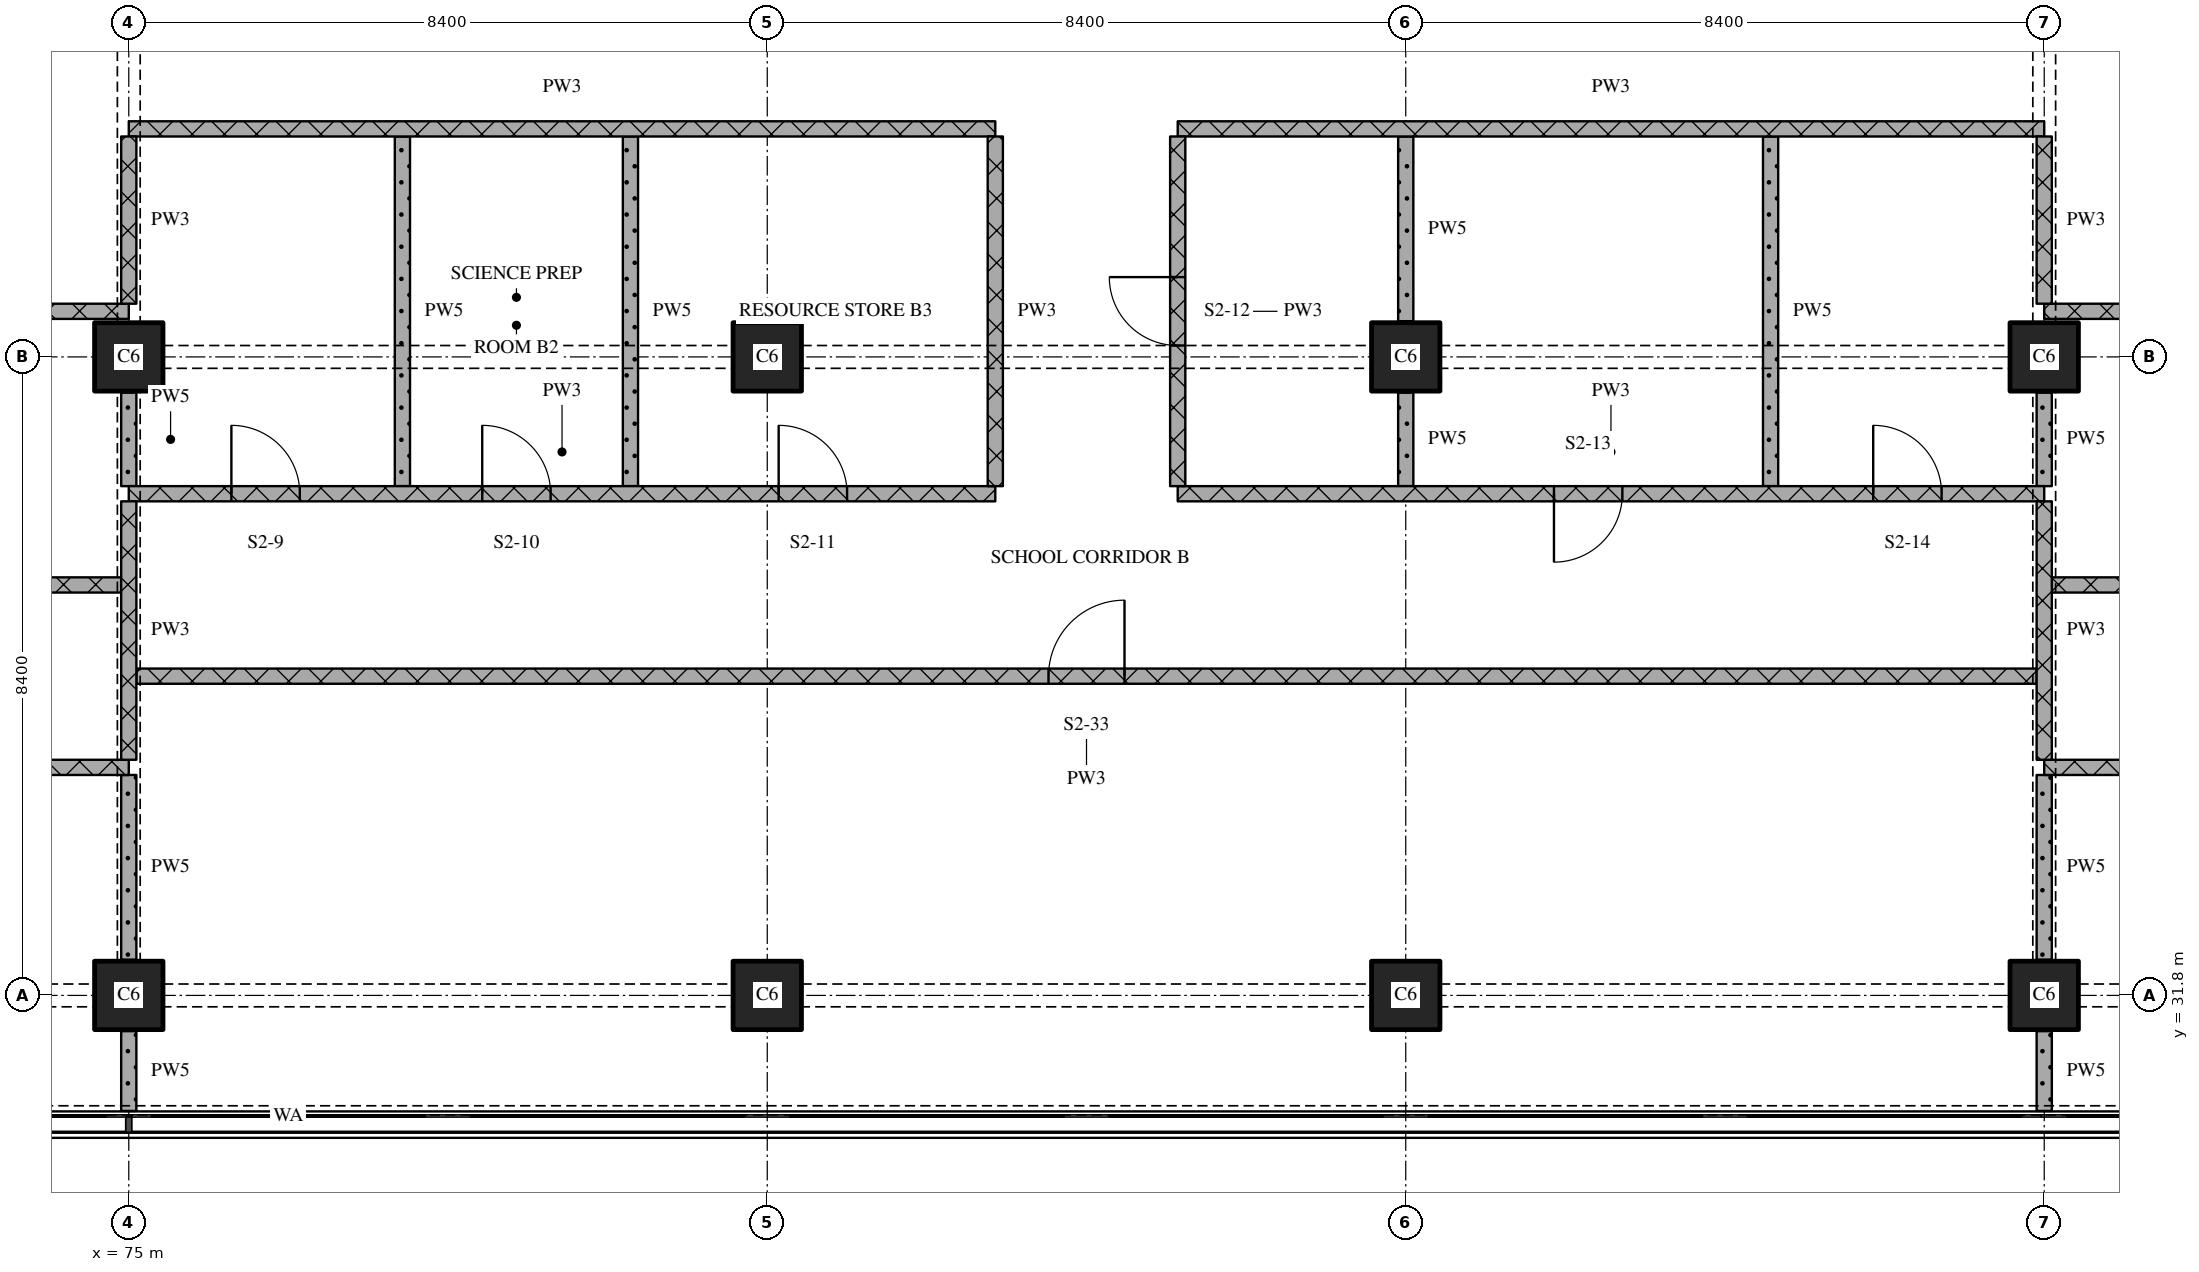
"""IFC4 building model, lengths in metres.
Left out: names, types, materials, properties, quantities, classifications, styles, units other than length and angle.
Written with IfcOpenShell. Run it as: python <this file> out.ifc"""

import sys

from ifc_helpers import new_model, si_unit, direction, frame, frame_2d, origin, origin_2d, place, context, subcontext, project, spatial, rectangle, extrude, element, fill, save


model = new_model("IFC4")
c1 = context("Model", 3, precision=1e-05, world=origin(), true_north=direction((0.0, 1.0)))
c2 = subcontext(c1, "Body", "Model", "MODEL_VIEW")
j1 = project(units=[si_unit("LENGTHUNIT", "METRE"), si_unit("PLANEANGLEUNIT", "RADIAN")], contexts=[c1])
p1 = place(None, origin())
s1 = spatial("IfcSite", under=j1, at=p1, CompositionType="ELEMENT")
p2 = place(p1, origin())
s2 = spatial("IfcBuilding", under=s1, at=p2, CompositionType="ELEMENT")
p3 = place(p2, frame((0.0, 0.0, 28.2)))
s3 = spatial("IfcBuildingStorey", under=s2, at=p3, CompositionType="ELEMENT", Elevation=28.2)
for number, where, z_axis, x_axis in (
    (1, (75.0, 31.8, 0.0), (0.0, 0.0, 1.0), (1.0, 0.0, 0.0)),
    (2, (75.0, 40.2, 0.0), (0.0, 0.0, 1.0), (1.0, 0.0, 0.0)),
    (3, (83.4, 31.8, 0.0), (0.0, 0.0, 1.0), (1.0, 0.0, 0.0)),
    (4, (83.4, 40.2, 0.0), (0.0, 0.0, 1.0), (1.0, 0.0, 0.0)),
    (5, (91.8, 31.8, 0.0), (0.0, 0.0, 1.0), (1.0, 0.0, 0.0)),
    (6, (91.8, 40.2, 0.0), (0.0, 0.0, 1.0), (1.0, 0.0, 0.0)),
    (7, (100.2, 31.8, 0.0), (0.0, 0.0, 1.0), (1.0, 0.0, 0.0)),
    (8, (100.2, 40.2, 0.0), (0.0, 0.0, 1.0), (1.0, 0.0, 0.0)),
):
    element("IfcColumn", number, at=place(p3, frame(where, z_axis=z_axis, x_axis=x_axis)), inside=s3, PredefinedType="COLUMN", context=c2, shape_type="SweptSolid", body=[
        extrude(rectangle(XDim=0.9, YDim=0.9, at=origin_2d()), origin(), (0.0, 0.0, 1.0), 4.5),
    ])
p4 = place(p3, frame((75.0, 34.8, 0.0), z_axis=(0.0, 0.0, 1.0), x_axis=(-1.0, 0.0, 0.0)))
e9 = element("IfcWall", 9, at=p4, inside=s3, PredefinedType="PARTITIONING", context=c2, shape_type="SweptSolid", body=[
    extrude(rectangle(XDim=26.72, YDim=0.2, at=frame_2d((13.36, 0.0))), origin(), (0.0, 0.0, 1.0), 4.2),
])
p5 = place(p4, frame((11.204, 0.0, 0.0)))
e10 = element("IfcOpeningElement", 10, at=p5, cuts=e9, PredefinedType="OPENING", context=c2, shape_type="SweptSolid", body=[
    extrude(rectangle(XDim=1.0, YDim=2.1, at=frame_2d((0.5, 1.05))), frame((0.0, 0.11, 0.0), z_axis=(0.0, -1.0, 0.0), x_axis=(1.0, 0.0, 0.0)), (0.0, 0.0, 1.0), 0.22),
])
p6 = place(p3, frame((126.92, 34.8, 0.0), z_axis=(0.0, 0.0, 1.0), x_axis=(-1.0, 0.0, 0.0)))
e11 = element("IfcWall", 11, at=p6, inside=s3, PredefinedType="PARTITIONING", context=c2, shape_type="SweptSolid", body=[
    extrude(rectangle(XDim=26.72, YDim=0.2, at=frame_2d((13.36, 0.0))), origin(), (0.0, 0.0, 1.0), 4.2),
])
p7 = place(p6, frame((14.516, 0.0, 0.0)))
e12 = element("IfcOpeningElement", 12, at=p7, cuts=e11, PredefinedType="OPENING", context=c2, shape_type="SweptSolid", body=[
    extrude(rectangle(XDim=1.0, YDim=2.1, at=frame_2d((0.5, 1.05))), frame((0.0, 0.11, 0.0), z_axis=(0.0, -1.0, 0.0), x_axis=(1.0, 0.0, 0.0)), (0.0, 0.0, 1.0), 0.22),
])
p8 = place(p3, frame((100.1, 36.0, 0.0), z_axis=(0.0, 0.0, 1.0), x_axis=(-1.0, 0.0, 0.0)))
e13 = element("IfcWall", 13, at=p8, inside=s3, PredefinedType="PARTITIONING", context=c2, shape_type="SweptSolid", body=[
    extrude(rectangle(XDim=25.0, YDim=0.2, at=frame_2d((12.5, 0.0))), origin(), (0.0, 0.0, 1.0), 4.2),
])
p9 = place(p8, frame((12.0, 0.0, 0.0)))
e14 = element("IfcOpeningElement", 14, at=p9, cuts=e13, PredefinedType="OPENING", context=c2, shape_type="SweptSolid", body=[
    extrude(rectangle(XDim=1.0, YDim=2.1, at=frame_2d((0.5, 1.05))), frame((0.0, 0.11, 0.0), z_axis=(0.0, -1.0, 0.0), x_axis=(1.0, 0.0, 0.0)), (0.0, 0.0, 1.0), 0.22),
])
p10 = place(p3, frame((63.9, 37.2, 0.0), z_axis=(0.0, 0.0, 1.0), x_axis=(1.0, 0.0, 0.0)))
e15 = element("IfcWall", 15, at=p10, inside=s3, PredefinedType="PARTITIONING", context=c2, shape_type="SweptSolid", body=[
    extrude(rectangle(XDim=11.0, YDim=0.2, at=frame_2d((5.5, 0.0))), origin(), (0.0, 0.0, 1.0), 4.2),
])
p11 = place(p10, frame((7.5, 0.0, 0.0)))
e16 = element("IfcOpeningElement", 16, at=p11, cuts=e15, PredefinedType="OPENING", context=c2, shape_type="SweptSolid", body=[
    extrude(rectangle(XDim=0.9, YDim=2.1, at=frame_2d((0.45, 1.05))), frame((0.0, 0.11, 0.0), z_axis=(0.0, -1.0, 0.0), x_axis=(1.0, 0.0, 0.0)), (0.0, 0.0, 1.0), 0.22),
])
p12 = place(p3, frame((100.3, 37.2, 0.0), z_axis=(0.0, 0.0, 1.0), x_axis=(1.0, 0.0, 0.0)))
e17 = element("IfcWall", 17, at=p12, inside=s3, PredefinedType="PARTITIONING", context=c2, shape_type="SweptSolid", body=[
    extrude(rectangle(XDim=11.0, YDim=0.2, at=frame_2d((5.5, 0.0))), origin(), (0.0, 0.0, 1.0), 4.2),
])
p13 = place(p12, frame((1.85, 0.0, 0.0)))
e18 = element("IfcOpeningElement", 18, at=p13, cuts=e17, PredefinedType="OPENING", context=c2, shape_type="SweptSolid", body=[
    extrude(rectangle(XDim=0.9, YDim=2.1, at=frame_2d((0.45, 1.05))), frame((0.0, 0.11, 0.0), z_axis=(0.0, -1.0, 0.0), x_axis=(1.0, 0.0, 0.0)), (0.0, 0.0, 1.0), 0.22),
])
p14 = place(p12, frame((7.4, 0.0, 0.0)))
e19 = element("IfcOpeningElement", 19, at=p14, cuts=e17, PredefinedType="OPENING", context=c2, shape_type="SweptSolid", body=[
    extrude(rectangle(XDim=0.9, YDim=2.1, at=frame_2d((0.45, 1.05))), frame((0.0, 0.11, 0.0), z_axis=(0.0, -1.0, 0.0), x_axis=(1.0, 0.0, 0.0)), (0.0, 0.0, 1.0), 0.22),
])
p15 = place(p3, frame((75.0, 38.4, 0.0), z_axis=(0.0, 0.0, 1.0), x_axis=(1.0, 0.0, 0.0)))
e20 = element("IfcWall", 20, at=p15, inside=s3, PredefinedType="PARTITIONING", context=c2, shape_type="SweptSolid", body=[
    extrude(rectangle(XDim=11.4, YDim=0.2, at=frame_2d((5.7, 0.0))), origin(), (0.0, 0.0, 1.0), 4.2),
])
p16 = place(p15, frame((1.35, 0.0, 0.0)))
e21 = element("IfcOpeningElement", 21, at=p16, cuts=e20, PredefinedType="OPENING", context=c2, shape_type="SweptSolid", body=[
    extrude(rectangle(XDim=0.9, YDim=2.1, at=frame_2d((0.45, 1.05))), frame((0.0, 0.11, 0.0), z_axis=(0.0, -1.0, 0.0), x_axis=(1.0, 0.0, 0.0)), (0.0, 0.0, 1.0), 0.22),
])
p17 = place(p15, frame((4.65, 0.0, 0.0)))
e22 = element("IfcOpeningElement", 22, at=p17, cuts=e20, PredefinedType="OPENING", context=c2, shape_type="SweptSolid", body=[
    extrude(rectangle(XDim=0.9, YDim=2.1, at=frame_2d((0.45, 1.05))), frame((0.0, 0.11, 0.0), z_axis=(0.0, -1.0, 0.0), x_axis=(1.0, 0.0, 0.0)), (0.0, 0.0, 1.0), 0.22),
])
p18 = place(p15, frame((8.55, 0.0, 0.0)))
e23 = element("IfcOpeningElement", 23, at=p18, cuts=e20, PredefinedType="OPENING", context=c2, shape_type="SweptSolid", body=[
    extrude(rectangle(XDim=0.9, YDim=2.1, at=frame_2d((0.45, 1.05))), frame((0.0, 0.11, 0.0), z_axis=(0.0, -1.0, 0.0), x_axis=(1.0, 0.0, 0.0)), (0.0, 0.0, 1.0), 0.22),
])
p19 = place(p3, frame((88.8, 38.4, 0.0), z_axis=(0.0, 0.0, 1.0), x_axis=(1.0, 0.0, 0.0)))
e24 = element("IfcWall", 24, at=p19, inside=s3, PredefinedType="PARTITIONING", context=c2, shape_type="SweptSolid", body=[
    extrude(rectangle(XDim=11.4, YDim=0.2, at=frame_2d((5.7, 0.0))), origin(), (0.0, 0.0, 1.0), 4.2),
])
p20 = place(p19, frame((4.95, 0.0, 0.0)))
e25 = element("IfcOpeningElement", 25, at=p20, cuts=e24, PredefinedType="OPENING", context=c2, shape_type="SweptSolid", body=[
    extrude(rectangle(XDim=0.9, YDim=2.1, at=frame_2d((0.45, 1.05))), frame((0.0, 0.11, 0.0), z_axis=(0.0, -1.0, 0.0), x_axis=(1.0, 0.0, 0.0)), (0.0, 0.0, 1.0), 0.22),
])
p21 = place(p19, frame((9.15, 0.0, 0.0)))
e26 = element("IfcOpeningElement", 26, at=p21, cuts=e24, PredefinedType="OPENING", context=c2, shape_type="SweptSolid", body=[
    extrude(rectangle(XDim=0.9, YDim=2.1, at=frame_2d((0.45, 1.05))), frame((0.0, 0.11, 0.0), z_axis=(0.0, -1.0, 0.0), x_axis=(1.0, 0.0, 0.0)), (0.0, 0.0, 1.0), 0.22),
])
for number, where, z_axis, x_axis in (
    (27, (63.9, 40.8, 0.0), (0.0, 0.0, 1.0), (1.0, 0.0, 0.0)),
    (28, (100.2, 40.8, 0.0), (0.0, 0.0, 1.0), (1.0, 0.0, 0.0)),
):
    element("IfcWall", number, at=place(p3, frame(where, z_axis=z_axis, x_axis=x_axis)), inside=s3, PredefinedType="PARTITIONING", context=c2, shape_type="SweptSolid", body=[
        extrude(rectangle(XDim=11.1, YDim=0.2, at=frame_2d((5.55, 0.0))), origin(), (0.0, 0.0, 1.0), 4.2),
    ])
for number, where, z_axis, x_axis in (
    (29, (75.0, 43.2, 0.0), (0.0, 0.0, 1.0), (1.0, 0.0, 0.0)),
    (30, (88.8, 43.2, 0.0), (0.0, 0.0, 1.0), (1.0, 0.0, 0.0)),
):
    element("IfcWall", number, at=place(p3, frame(where, z_axis=z_axis, x_axis=x_axis)), inside=s3, PredefinedType="PARTITIONING", context=c2, shape_type="SweptSolid", body=[
        extrude(rectangle(XDim=11.4, YDim=0.2, at=frame_2d((5.7, 0.0))), origin(), (0.0, 0.0, 1.0), 4.2),
    ])
p22 = place(p3, frame((75.0, 38.3, 0.0), z_axis=(0.0, 0.0, 1.0), x_axis=(0.0, -1.0, 0.0)))
e31 = element("IfcWall", 31, at=p22, inside=s3, PredefinedType="PARTITIONING", context=c2, shape_type="SweptSolid", body=[
    extrude(rectangle(XDim=3.4, YDim=0.2, at=frame_2d((1.7, 0.0))), origin(), (0.0, 0.0, 1.0), 3.7),
])
p23 = place(p3, frame((75.0, 43.1, 0.0), z_axis=(0.0, 0.0, 1.0), x_axis=(0.0, -1.0, 0.0)))
e32 = element("IfcWall", 32, at=p23, inside=s3, PredefinedType="PARTITIONING", context=c2, shape_type="SweptSolid", body=[
    extrude(rectangle(XDim=2.2, YDim=0.2, at=frame_2d((1.1, 0.0))), origin(), (0.0, 0.0, 1.0), 3.3),
])
p24 = place(p3, frame((75.0, 31.33, 0.0), z_axis=(0.0, 0.0, 1.0), x_axis=(0.0, -1.0, 0.0)))
e33 = element("IfcWall", 33, at=p24, inside=s3, PredefinedType="PARTITIONING", context=c2, shape_type="SweptSolid", body=[
    extrude(rectangle(XDim=1.05, YDim=0.2, at=frame_2d((0.525, 0.0))), origin(), (0.0, 0.0, 1.0), 4.2),
])
p25 = place(p3, frame((75.0, 34.7, 0.0), z_axis=(0.0, 0.0, 1.0), x_axis=(0.0, -1.0, 0.0)))
e34 = element("IfcWall", 34, at=p25, inside=s3, PredefinedType="PARTITIONING", context=c2, shape_type="SweptSolid", body=[
    extrude(rectangle(XDim=2.43, YDim=0.2, at=frame_2d((1.215, 0.0))), origin(), (0.0, 0.0, 1.0), 3.7),
])
p26 = place(p3, frame((75.0, 39.73, 0.0), z_axis=(0.0, 0.0, 1.0), x_axis=(0.0, -1.0, 0.0)))
e35 = element("IfcWall", 35, at=p26, inside=s3, PredefinedType="PARTITIONING", context=c2, shape_type="SweptSolid", body=[
    extrude(rectangle(XDim=1.23, YDim=0.2, at=frame_2d((0.615, 0.0))), origin(), (0.0, 0.0, 1.0), 3.7),
])
for number, where, z_axis, x_axis in (
    (36, (78.6, 43.1, 0.0), (0.0, 0.0, 1.0), (0.0, -1.0, 0.0)),
    (37, (81.6, 43.1, 0.0), (0.0, 0.0, 1.0), (0.0, -1.0, 0.0)),
    (38, (86.4, 43.1, 0.0), (0.0, 0.0, 1.0), (0.0, -1.0, 0.0)),
):
    element("IfcWall", number, at=place(p3, frame(where, z_axis=z_axis, x_axis=x_axis)), inside=s3, PredefinedType="PARTITIONING", context=c2, shape_type="SweptSolid", body=[
        extrude(rectangle(XDim=4.6, YDim=0.2, at=frame_2d((2.3, 0.0))), origin(), (0.0, 0.0, 1.0), 4.2),
    ])
p27 = place(p3, frame((88.8, 43.1, 0.0), z_axis=(0.0, 0.0, 1.0), x_axis=(0.0, -1.0, 0.0)))
e39 = element("IfcWall", 39, at=p27, inside=s3, PredefinedType="PARTITIONING", context=c2, shape_type="SweptSolid", body=[
    extrude(rectangle(XDim=4.6, YDim=0.2, at=frame_2d((2.3, 0.0))), origin(), (0.0, 0.0, 1.0), 4.2),
])
p28 = place(p27, frame((1.85, 0.0, 0.0)))
e40 = element("IfcOpeningElement", 40, at=p28, cuts=e39, PredefinedType="OPENING", context=c2, shape_type="SweptSolid", body=[
    extrude(rectangle(XDim=0.9, YDim=2.1, at=frame_2d((0.45, 1.05))), frame((0.0, 0.11, 0.0), z_axis=(0.0, -1.0, 0.0), x_axis=(1.0, 0.0, 0.0)), (0.0, 0.0, 1.0), 0.22),
])
p29 = place(p3, frame((91.8, 39.73, 0.0), z_axis=(0.0, 0.0, 1.0), x_axis=(0.0, -1.0, 0.0)))
e41 = element("IfcWall", 41, at=p29, inside=s3, PredefinedType="PARTITIONING", context=c2, shape_type="SweptSolid", body=[
    extrude(rectangle(XDim=1.23, YDim=0.2, at=frame_2d((0.615, 0.0))), origin(), (0.0, 0.0, 1.0), 4.2),
])
p30 = place(p3, frame((91.8, 43.1, 0.0), z_axis=(0.0, 0.0, 1.0), x_axis=(0.0, -1.0, 0.0)))
e42 = element("IfcWall", 42, at=p30, inside=s3, PredefinedType="PARTITIONING", context=c2, shape_type="SweptSolid", body=[
    extrude(rectangle(XDim=2.43, YDim=0.2, at=frame_2d((1.215, 0.0))), origin(), (0.0, 0.0, 1.0), 4.2),
])
p31 = place(p3, frame((96.6, 43.1, 0.0), z_axis=(0.0, 0.0, 1.0), x_axis=(0.0, -1.0, 0.0)))
e43 = element("IfcWall", 43, at=p31, inside=s3, PredefinedType="PARTITIONING", context=c2, shape_type="SweptSolid", body=[
    extrude(rectangle(XDim=4.6, YDim=0.2, at=frame_2d((2.3, 0.0))), origin(), (0.0, 0.0, 1.0), 4.2),
])
p32 = place(p3, frame((100.2, 38.3, 0.0), z_axis=(0.0, 0.0, 1.0), x_axis=(0.0, -1.0, 0.0)))
e44 = element("IfcWall", 44, at=p32, inside=s3, PredefinedType="PARTITIONING", context=c2, shape_type="SweptSolid", body=[
    extrude(rectangle(XDim=3.4, YDim=0.2, at=frame_2d((1.7, 0.0))), origin(), (0.0, 0.0, 1.0), 3.7),
])
p33 = place(p3, frame((100.2, 43.1, 0.0), z_axis=(0.0, 0.0, 1.0), x_axis=(0.0, -1.0, 0.0)))
e45 = element("IfcWall", 45, at=p33, inside=s3, PredefinedType="PARTITIONING", context=c2, shape_type="SweptSolid", body=[
    extrude(rectangle(XDim=2.2, YDim=0.2, at=frame_2d((1.1, 0.0))), origin(), (0.0, 0.0, 1.0), 3.3),
])
p34 = place(p3, frame((100.2, 31.33, 0.0), z_axis=(0.0, 0.0, 1.0), x_axis=(0.0, -1.0, 0.0)))
e46 = element("IfcWall", 46, at=p34, inside=s3, PredefinedType="PARTITIONING", context=c2, shape_type="SweptSolid", body=[
    extrude(rectangle(XDim=1.05, YDim=0.2, at=frame_2d((0.525, 0.0))), origin(), (0.0, 0.0, 1.0), 4.2),
])
p35 = place(p3, frame((100.2, 34.7, 0.0), z_axis=(0.0, 0.0, 1.0), x_axis=(0.0, -1.0, 0.0)))
e47 = element("IfcWall", 47, at=p35, inside=s3, PredefinedType="PARTITIONING", context=c2, shape_type="SweptSolid", body=[
    extrude(rectangle(XDim=2.43, YDim=0.2, at=frame_2d((1.215, 0.0))), origin(), (0.0, 0.0, 1.0), 3.7),
])
p36 = place(p3, frame((100.2, 39.73, 0.0), z_axis=(0.0, 0.0, 1.0), x_axis=(0.0, -1.0, 0.0)))
e48 = element("IfcWall", 48, at=p36, inside=s3, PredefinedType="PARTITIONING", context=c2, shape_type="SweptSolid", body=[
    extrude(rectangle(XDim=1.23, YDim=0.2, at=frame_2d((0.615, 0.0))), origin(), (0.0, 0.0, 1.0), 3.7),
])
p37 = place(p9, origin())
e49 = element("IfcDoor", 49, at=p37, inside=s3, OperationType="SINGLE_SWING_RIGHT", PredefinedType="DOOR", context=c2, shape_type="SweptSolid", body=[
    extrude(rectangle(XDim=1.0, YDim=2.1, at=frame_2d((0.5, 1.05))), frame((0.0, 0.025, 0.0), z_axis=(0.0, -1.0, 0.0), x_axis=(1.0, 0.0, 0.0)), (0.0, 0.0, 1.0), 0.05),
])
fill(e14, e49)
p38 = place(p16, origin())
e50 = element("IfcDoor", 50, at=p38, inside=s3, OperationType="SINGLE_SWING_LEFT", PredefinedType="DOOR", context=c2, shape_type="SweptSolid", body=[
    extrude(rectangle(XDim=0.9, YDim=2.1, at=frame_2d((0.45, 1.05))), frame((0.0, 0.025, 0.0), z_axis=(0.0, -1.0, 0.0), x_axis=(1.0, 0.0, 0.0)), (0.0, 0.0, 1.0), 0.05),
])
fill(e21, e50)
p39 = place(p17, origin())
e51 = element("IfcDoor", 51, at=p39, inside=s3, OperationType="SINGLE_SWING_LEFT", PredefinedType="DOOR", context=c2, shape_type="SweptSolid", body=[
    extrude(rectangle(XDim=0.9, YDim=2.1, at=frame_2d((0.45, 1.05))), frame((0.0, 0.025, 0.0), z_axis=(0.0, -1.0, 0.0), x_axis=(1.0, 0.0, 0.0)), (0.0, 0.0, 1.0), 0.05),
])
fill(e22, e51)
p40 = place(p18, origin())
e52 = element("IfcDoor", 52, at=p40, inside=s3, OperationType="SINGLE_SWING_LEFT", PredefinedType="DOOR", context=c2, shape_type="SweptSolid", body=[
    extrude(rectangle(XDim=0.9, YDim=2.1, at=frame_2d((0.45, 1.05))), frame((0.0, 0.025, 0.0), z_axis=(0.0, -1.0, 0.0), x_axis=(1.0, 0.0, 0.0)), (0.0, 0.0, 1.0), 0.05),
])
fill(e23, e52)
p41 = place(p20, origin())
e53 = element("IfcDoor", 53, at=p41, inside=s3, OperationType="SINGLE_SWING_RIGHT", PredefinedType="DOOR", context=c2, shape_type="SweptSolid", body=[
    extrude(rectangle(XDim=0.9, YDim=2.1, at=frame_2d((0.45, 1.05))), frame((0.0, 0.025, 0.0), z_axis=(0.0, -1.0, 0.0), x_axis=(1.0, 0.0, 0.0)), (0.0, 0.0, 1.0), 0.05),
])
fill(e25, e53)
p42 = place(p21, origin())
e54 = element("IfcDoor", 54, at=p42, inside=s3, OperationType="SINGLE_SWING_LEFT", PredefinedType="DOOR", context=c2, shape_type="SweptSolid", body=[
    extrude(rectangle(XDim=0.9, YDim=2.1, at=frame_2d((0.45, 1.05))), frame((0.0, 0.025, 0.0), z_axis=(0.0, -1.0, 0.0), x_axis=(1.0, 0.0, 0.0)), (0.0, 0.0, 1.0), 0.05),
])
fill(e26, e54)
p43 = place(p28, origin())
e55 = element("IfcDoor", 55, at=p43, inside=s3, OperationType="SINGLE_SWING_RIGHT", PredefinedType="DOOR", context=c2, shape_type="SweptSolid", body=[
    extrude(rectangle(XDim=0.9, YDim=2.1, at=frame_2d((0.45, 1.05))), frame((0.0, 0.025, 0.0), z_axis=(0.0, -1.0, 0.0), x_axis=(1.0, 0.0, 0.0)), (0.0, 0.0, 1.0), 0.05),
])
fill(e40, e55)
save(model, sys.argv[1])
